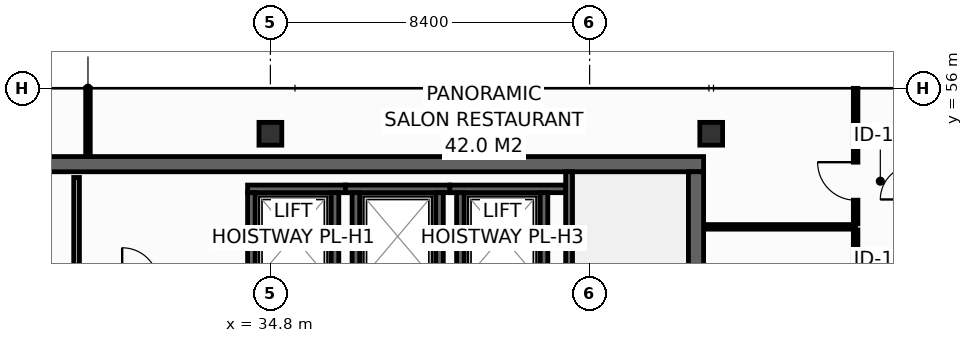
"""IFC4 building model, lengths in metres.
Left out: names, types, materials, properties, quantities, classifications, styles, units other than length and angle.
Written with IfcOpenShell. Run it as: python <this file> out.ifc"""

import sys

from ifc_helpers import new_model, si_unit, direction, frame, frame_2d, origin, origin_2d, place, context, subcontext, project, spatial, rectangle, hollow_rectangle, extrude, element, fill, save


model = new_model("IFC4")
c1 = context("Model", 3, precision=1e-05, world=origin(), true_north=direction((0.0, 1.0)))
c2 = subcontext(c1, "Body", "Model", "MODEL_VIEW")
j1 = project(units=[si_unit("LENGTHUNIT", "METRE"), si_unit("PLANEANGLEUNIT", "RADIAN")], contexts=[c1])
p1 = place(None, origin())
s1 = spatial("IfcSite", under=j1, at=p1, CompositionType="ELEMENT")
p2 = place(p1, origin())
s2 = spatial("IfcBuilding", under=s1, at=p2, CompositionType="ELEMENT")
p3 = place(p2, frame((0.0, 0.0, 261.0)))
s3 = spatial("IfcBuildingStorey", under=s2, at=p3, CompositionType="ELEMENT", Elevation=261.0)
p4 = place(p3, frame((13.7, 54.0, 0.0), z_axis=(0.0, 0.0, 1.0), x_axis=(1.0, 0.0, 0.0)))
e1 = element("IfcWall", 1, at=p4, inside=s3, PredefinedType="SHEAR", context=c2, shape_type="SweptSolid", body=[
    extrude(rectangle(XDim=32.5, YDim=0.4, at=frame_2d((16.25, 0.0))), origin(), (0.0, 0.0, 1.0), 3.55),
])
p5 = place(p3, frame((46.0, 43.4, 0.0), z_axis=(0.0, 0.0, 1.0), x_axis=(0.0, 1.0, 0.0)))
e2 = element("IfcWall", 2, at=p5, inside=s3, PredefinedType="SHEAR", context=c2, shape_type="SweptSolid", body=[
    extrude(rectangle(XDim=10.4, YDim=0.4, at=frame_2d((5.2, 0.0))), origin(), (0.0, 0.0, 1.0), 3.55),
])
for number, where, z_axis, x_axis in (
    (3, (34.8, 54.8, 0.0), (0.0, 0.0, 1.0), (1.0, 0.0, 0.0)),
    (4, (46.4, 54.8, 0.0), (0.0, 0.0, 1.0), (1.0, 0.0, 0.0)),
):
    element("IfcColumn", number, at=place(p3, frame(where, z_axis=z_axis, x_axis=x_axis)), inside=s3, PredefinedType="COLUMN", context=c2, shape_type="SweptSolid", body=[
        extrude(hollow_rectangle(XDim=0.6, YDim=0.6, WallThickness=0.028, at=origin_2d()), origin(), (0.0, 0.0, 1.0), 3.8),
    ])
p6 = place(p3, frame((34.2, 53.35, 0.0), z_axis=(0.0, 0.0, 1.0), x_axis=(1.0, 0.0, 0.0)))
e5 = element("IfcWall", 5, at=p6, inside=s3, PredefinedType="SHEAR", context=c2, shape_type="SweptSolid", body=[
    extrude(rectangle(XDim=2.575, YDim=0.2, at=frame_2d((1.288, 0.0))), origin(), (0.0, 0.0, 1.0), 3.55),
])
for number, where, z_axis, x_axis in (
    (6, (34.3, 50.95, 0.0), (0.0, 0.0, 1.0), (0.0, 1.0, 0.0)),
    (7, (36.5, 50.95, 0.0), (0.0, 0.0, 1.0), (0.0, 1.0, 0.0)),
):
    element("IfcWall", number, at=place(p3, frame(where, z_axis=z_axis, x_axis=x_axis)), inside=s3, PredefinedType="SHEAR", context=c2, shape_type="SweptSolid", body=[
        extrude(rectangle(XDim=2.3, YDim=0.2, at=frame_2d((1.15, 0.0))), origin(), (0.0, 0.0, 1.0), 3.55),
    ])
p7 = place(p3, frame((36.775, 53.35, 0.0), z_axis=(0.0, 0.0, 1.0), x_axis=(1.0, 0.0, 0.0)))
e8 = element("IfcWall", 8, at=p7, inside=s3, PredefinedType="SHEAR", context=c2, shape_type="SweptSolid", body=[
    extrude(rectangle(XDim=2.75, YDim=0.2, at=frame_2d((1.375, 0.0))), origin(), (0.0, 0.0, 1.0), 3.55),
])
for number, where, z_axis, x_axis in (
    (9, (37.05, 50.95, 0.0), (0.0, 0.0, 1.0), (0.0, 1.0, 0.0)),
    (10, (39.25, 50.95, 0.0), (0.0, 0.0, 1.0), (0.0, 1.0, 0.0)),
):
    element("IfcWall", number, at=place(p3, frame(where, z_axis=z_axis, x_axis=x_axis)), inside=s3, PredefinedType="SHEAR", context=c2, shape_type="SweptSolid", body=[
        extrude(rectangle(XDim=2.3, YDim=0.2, at=frame_2d((1.15, 0.0))), origin(), (0.0, 0.0, 1.0), 3.55),
    ])
p8 = place(p3, frame((39.525, 53.35, 0.0), z_axis=(0.0, 0.0, 1.0), x_axis=(1.0, 0.0, 0.0)))
e11 = element("IfcWall", 11, at=p8, inside=s3, PredefinedType="SHEAR", context=c2, shape_type="SweptSolid", body=[
    extrude(rectangle(XDim=3.045, YDim=0.2, at=frame_2d((1.522, 0.0))), origin(), (0.0, 0.0, 1.0), 3.55),
])
for number, where, z_axis, x_axis in (
    (12, (39.8, 50.95, 0.0), (0.0, 0.0, 1.0), (0.0, 1.0, 0.0)),
    (13, (42.0, 50.95, 0.0), (0.0, 0.0, 1.0), (0.0, 1.0, 0.0)),
):
    element("IfcWall", number, at=place(p3, frame(where, z_axis=z_axis, x_axis=x_axis)), inside=s3, PredefinedType="SHEAR", context=c2, shape_type="SweptSolid", body=[
        extrude(rectangle(XDim=2.3, YDim=0.2, at=frame_2d((1.15, 0.0))), origin(), (0.0, 0.0, 1.0), 3.55),
    ])
p9 = place(p3, frame((42.66, 53.8, 0.0), z_axis=(0.0, 0.0, 1.0), x_axis=(0.0, -1.0, 0.0)))
e14 = element("IfcWall", 14, at=p9, inside=s3, PredefinedType="SHEAR", context=c2, shape_type="SweptSolid", body=[
    extrude(rectangle(XDim=10.4, YDim=0.18, at=frame_2d((5.2, 0.0))), origin(), (0.0, 0.0, 1.0), 3.55),
])
p10 = place(p9, frame((8.99, 0.0, 0.0)))
e15 = element("IfcOpeningElement", 15, at=p10, cuts=e14, PredefinedType="OPENING", context=c2, shape_type="SweptSolid", body=[
    extrude(rectangle(XDim=1.1, YDim=2.15, at=frame_2d((0.55, 1.075))), frame((0.0, 0.1, 0.0), z_axis=(0.0, -1.0, 0.0), x_axis=(1.0, 0.0, 0.0)), (0.0, 0.0, 1.0), 0.2),
])
p11 = place(p3, frame((29.7, 50.95, 0.0), z_axis=(0.0, 0.0, 1.0), x_axis=(0.0, 1.0, 0.0)))
e16 = element("IfcWall", 16, at=p11, inside=s3, PredefinedType="PARTITIONING", context=c2, shape_type="SweptSolid", body=[
    extrude(rectangle(XDim=2.7, YDim=0.15, at=frame_2d((1.35, 0.0))), origin(), (0.0, 0.0, 1.0), 3.55),
])
p12 = place(p3, frame((46.22, 52.35, 0.0), z_axis=(0.0, 0.0, 1.0), x_axis=(1.0, 0.0, 0.0)))
e17 = element("IfcWall", 17, at=p12, inside=s3, PredefinedType="PARTITIONING", context=c2, shape_type="SweptSolid", body=[
    extrude(rectangle(XDim=3.98, YDim=0.12, at=frame_2d((1.99, 0.0))), origin(), (0.0, 0.0, 1.0), 3.55),
])
p13 = place(p3, frame((30.0, 54.22, 0.0), z_axis=(0.0, 0.0, 1.0), x_axis=(0.0, 1.0, 0.0)))
e18 = element("IfcWall", 18, at=p13, inside=s3, PredefinedType="PARTITIONING", context=c2, shape_type="SweptSolid", body=[
    extrude(rectangle(XDim=1.775, YDim=0.12, at=frame_2d((0.888, 0.0))), origin(), (0.0, 0.0, 1.0), 2.935),
])
p14 = place(p3, frame((50.2, 48.29, 0.0), z_axis=(0.0, 0.0, 1.0), x_axis=(0.0, 1.0, 0.0)))
e19 = element("IfcWall", 19, at=p14, inside=s3, PredefinedType="PARTITIONING", context=c2, shape_type="SweptSolid", body=[
    extrude(rectangle(XDim=3.98, YDim=0.12, at=frame_2d((1.99, 0.0))), origin(), (0.0, 0.0, 1.0), 3.55),
])
p15 = place(p14, frame((1.49, 0.0, 0.0)))
e20 = element("IfcOpeningElement", 20, at=p15, cuts=e19, PredefinedType="OPENING", context=c2, shape_type="SweptSolid", body=[
    extrude(rectangle(XDim=1.0, YDim=2.15, at=frame_2d((0.5, 1.075))), frame((0.0, 0.07, 0.0), z_axis=(0.0, -1.0, 0.0), x_axis=(1.0, 0.0, 0.0)), (0.0, 0.0, 1.0), 0.14),
])
p16 = place(p3, frame((50.2, 52.43, 0.0), z_axis=(0.0, 0.0, 1.0), x_axis=(0.0, 1.0, 0.0)))
e21 = element("IfcWall", 21, at=p16, inside=s3, PredefinedType="PARTITIONING", context=c2, shape_type="SweptSolid", body=[
    extrude(rectangle(XDim=3.565, YDim=0.12, at=frame_2d((1.783, 0.0))), origin(), (0.0, 0.0, 1.0), 2.935),
])
p17 = place(p16, frame((0.622, 0.0, 0.0)))
e22 = element("IfcOpeningElement", 22, at=p17, cuts=e21, PredefinedType="OPENING", context=c2, shape_type="SweptSolid", body=[
    extrude(rectangle(XDim=1.0, YDim=2.15, at=frame_2d((0.5, 1.075))), frame((0.0, 0.07, 0.0), z_axis=(0.0, -1.0, 0.0), x_axis=(1.0, 0.0, 0.0)), (0.0, 0.0, 1.0), 0.14),
])
p18 = place(p17, origin())
e23 = element("IfcDoor", 23, at=p18, inside=s3, OperationType="SINGLE_SWING_RIGHT", PredefinedType="DOOR", context=c2, shape_type="SweptSolid", body=[
    extrude(rectangle(XDim=1.0, YDim=2.15, at=frame_2d((0.5, 1.075))), frame((0.0, 0.025, 0.0), z_axis=(0.0, -1.0, 0.0), x_axis=(1.0, 0.0, 0.0)), (0.0, 0.0, 1.0), 0.05),
])
fill(e22, e23)
save(model, sys.argv[1])
